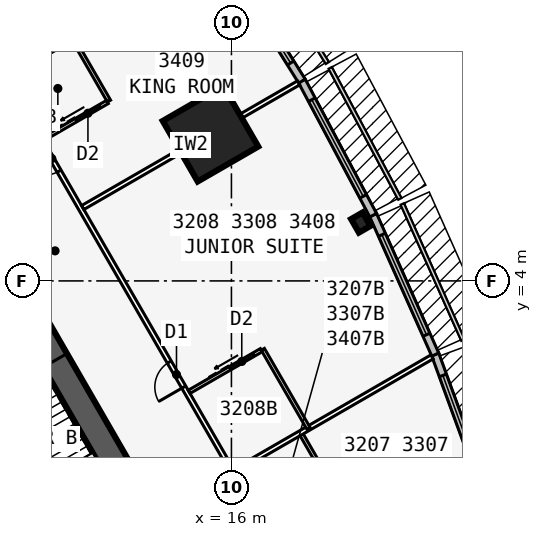
"""IFC4 building model, lengths in metres.
Left out: names, types, materials, properties, quantities, classifications, styles, units other than length and angle.
Written with IfcOpenShell. Run it as: python <this file> out.ifc"""

import sys

from ifc_helpers import new_model, si_unit, direction, frame, frame_2d, origin, origin_2d, place, context, subcontext, project, spatial, rectangle, i_section, extrude, element, fill, save


model = new_model("IFC4")
c1 = context("Model", 3, precision=1e-05, world=origin(), true_north=direction((0.0, 1.0)))
c2 = subcontext(c1, "Body", "Model", "MODEL_VIEW")
j1 = project(units=[si_unit("LENGTHUNIT", "METRE"), si_unit("PLANEANGLEUNIT", "RADIAN")], contexts=[c1])
p1 = place(None, origin())
s1 = spatial("IfcSite", under=j1, at=p1, CompositionType="ELEMENT")
p2 = place(p1, origin())
s2 = spatial("IfcBuilding", under=s1, at=p2, CompositionType="ELEMENT")
p3 = place(p2, frame((0.0, 0.0, 124.9)))
s3 = spatial("IfcBuildingStorey", under=s2, at=p3, CompositionType="ELEMENT", Elevation=124.9)
p4 = place(p3, frame((16.5, -9.526, 0.0), z_axis=(0.0, 0.0, 1.0), x_axis=(-0.499999749417, 0.866025548458, 0.0)))
e1 = element("IfcWall", 1, at=p4, inside=s3, PredefinedType="SHEAR", context=c2, shape_type="SweptSolid", body=[
    extrude(rectangle(XDim=33.0, YDim=0.9, at=frame_2d((16.5, 0.0))), origin(), (0.0, 0.0, 1.0), 3.4),
])
p5 = place(p4, frame((14.15, 0.0, 0.0)))
e2 = element("IfcOpeningElement", 2, at=p5, cuts=e1, PredefinedType="OPENING", context=c2, shape_type="SweptSolid", body=[
    extrude(rectangle(XDim=1.8, YDim=2.13, at=frame_2d((0.9, 1.065))), frame((0.0, 0.46, 0.0), z_axis=(0.0, -1.0, 0.0), x_axis=(1.0, 0.0, 0.0)), (0.0, 0.0, 1.0), 0.92),
])
p6 = place(p4, frame((12.6, 0.0, 0.0)))
e3 = element("IfcOpeningElement", 3, at=p6, cuts=e1, PredefinedType="OPENING", context=c2, shape_type="SweptSolid", body=[
    extrude(rectangle(XDim=1.0, YDim=2.13, at=frame_2d((0.5, 1.065))), frame((0.0, 0.46, 0.0), z_axis=(0.0, -1.0, 0.0), x_axis=(1.0, 0.0, 0.0)), (0.0, 0.0, 1.0), 0.92),
])
p7 = place(p3, frame((10.245, -5.843, 0.0), z_axis=(0.0, 0.0, 1.0), x_axis=(-0.499993009313, 0.866029439822, 0.0)))
e4 = element("IfcWall", 4, at=p7, inside=s3, PredefinedType="SOLIDWALL", context=c2, shape_type="SweptSolid", body=[
    extrude(rectangle(XDim=7.733, YDim=0.25, at=frame_2d((3.866, 0.0))), origin(), (0.0, 0.0, 1.0), 3.235),
])
p8 = place(p3, frame((20.254, 5.92, 0.0), z_axis=(0.0, 0.0, 1.0), x_axis=(0.866025403784, 0.5, 0.0)))
e5 = element("IfcColumn", 5, at=p8, inside=s3, PredefinedType="COLUMN", context=c2, shape_type="SweptSolid", body=[
    extrude(i_section(OverallWidth=0.437, OverallDepth=0.513, WebThickness=0.061, FlangeThickness=0.097, at=origin_2d()), origin(), (0.0, 0.0, 1.0), 3.4),
])
p9 = place(p3, frame((15.312, 8.84, 0.0), z_axis=(0.0, 0.0, 1.0), x_axis=(0.866025403784, 0.5, 0.0)))
e6 = element("IfcColumn", 6, at=p9, inside=s3, PredefinedType="COLUMN", context=c2, shape_type="SweptSolid", body=[
    extrude(rectangle(XDim=2.3, YDim=2.3, at=origin_2d()), origin(), (0.0, 0.0, 1.0), 3.4),
])
p10 = place(p3, frame((24.444, -3.183, 0.0), z_axis=(0.0, 0.0, 1.0), x_axis=(-0.343225593282, 0.939252996863, 0.0)))
e7 = element("IfcWall", 7, at=p10, inside=s3, PredefinedType="STANDARD", context=c2, shape_type="SweptSolid", body=[
    extrude(rectangle(XDim=5.076, YDim=0.25, at=frame_2d((2.538, 0.0))), origin(), (0.0, 0.0, 1.0), 3.235),
])
p11 = place(p10, frame((0.738, 0.0, 0.45)))
e8 = element("IfcOpeningElement", 8, at=p11, cuts=e7, PredefinedType="OPENING", context=c2, shape_type="SweptSolid", body=[
    extrude(rectangle(XDim=3.6, YDim=2.4, at=frame_2d((1.8, 1.2))), frame((0.0, 0.135, 0.0), z_axis=(0.0, -1.0, 0.0), x_axis=(1.0, 0.0, 0.0)), (0.0, 0.0, 1.0), 0.27),
])
p12 = place(p3, frame((22.705, 1.576, 0.0), z_axis=(0.0, 0.0, 1.0), x_axis=(-0.406832200364, 0.913502906808, 0.0)))
e9 = element("IfcWall", 9, at=p12, inside=s3, PredefinedType="STANDARD", context=c2, shape_type="SweptSolid", body=[
    extrude(rectangle(XDim=5.028, YDim=0.25, at=frame_2d((2.514, 0.0))), origin(), (0.0, 0.0, 1.0), 3.235),
])
p13 = place(p12, frame((0.714, 0.0, 0.45)))
e10 = element("IfcOpeningElement", 10, at=p13, cuts=e9, PredefinedType="OPENING", context=c2, shape_type="SweptSolid", body=[
    extrude(rectangle(XDim=3.6, YDim=2.4, at=frame_2d((1.8, 1.2))), frame((0.0, 0.135, 0.0), z_axis=(0.0, -1.0, 0.0), x_axis=(1.0, 0.0, 0.0)), (0.0, 0.0, 1.0), 0.27),
])
p14 = place(p3, frame((20.663, 6.161, 0.0), z_axis=(0.0, 0.0, 1.0), x_axis=(-0.469404966864, 0.882982999317, 0.0)))
e11 = element("IfcWall", 11, at=p14, inside=s3, PredefinedType="STANDARD", context=c2, shape_type="SweptSolid", body=[
    extrude(rectangle(XDim=5.003, YDim=0.25, at=frame_2d((2.501, 0.0))), origin(), (0.0, 0.0, 1.0), 3.235),
])
p15 = place(p14, frame((0.701, 0.0, 0.45)))
e12 = element("IfcOpeningElement", 12, at=p15, cuts=e11, PredefinedType="OPENING", context=c2, shape_type="SweptSolid", body=[
    extrude(rectangle(XDim=3.6, YDim=2.4, at=frame_2d((1.8, 1.2))), frame((0.0, 0.135, 0.0), z_axis=(0.0, -1.0, 0.0), x_axis=(1.0, 0.0, 0.0)), (0.0, 0.0, 1.0), 0.27),
])
p16 = place(p3, frame((18.319, 10.571, 0.0), z_axis=(0.0, 0.0, 1.0), x_axis=(-0.529990167382, 0.84800378683, 0.0)))
e13 = element("IfcWall", 13, at=p16, inside=s3, PredefinedType="STANDARD", context=c2, shape_type="SweptSolid", body=[
    extrude(rectangle(XDim=5.003, YDim=0.25, at=frame_2d((2.501, 0.0))), origin(), (0.0, 0.0, 1.0), 3.235),
])
p17 = place(p16, frame((0.701, 0.0, 0.45)))
e14 = element("IfcOpeningElement", 14, at=p17, cuts=e13, PredefinedType="OPENING", context=c2, shape_type="SweptSolid", body=[
    extrude(rectangle(XDim=3.6, YDim=2.4, at=frame_2d((1.8, 1.2))), frame((0.0, 0.135, 0.0), z_axis=(0.0, -1.0, 0.0), x_axis=(1.0, 0.0, 0.0)), (0.0, 0.0, 1.0), 0.27),
])
p18 = place(p3, frame((21.586, -11.885, 0.0), z_axis=(0.0, 0.0, 1.0), x_axis=(-0.500001915564, 0.86602429783, 0.0)))
e15 = element("IfcWall", 15, at=p18, inside=s3, PredefinedType="PARTITIONING", context=c2, shape_type="SweptSolid", body=[
    extrude(rectangle(XDim=42.172, YDim=0.15, at=frame_2d((21.086, 0.0))), origin(), (0.0, 0.0, 1.0), 3.235),
])
p19 = place(p18, frame((1.911, 0.0, 0.0)))
e16 = element("IfcOpeningElement", 16, at=p19, cuts=e15, PredefinedType="OPENING", context=c2, shape_type="SweptSolid", body=[
    extrude(rectangle(XDim=0.95, YDim=2.13, at=frame_2d((0.475, 1.065))), frame((0.0, 0.085, 0.0), z_axis=(0.0, -1.0, 0.0), x_axis=(1.0, 0.0, 0.0)), (0.0, 0.0, 1.0), 0.17),
])
p20 = place(p18, frame((7.511, 0.0, 0.0)))
e17 = element("IfcOpeningElement", 17, at=p20, cuts=e15, PredefinedType="OPENING", context=c2, shape_type="SweptSolid", body=[
    extrude(rectangle(XDim=0.95, YDim=2.13, at=frame_2d((0.475, 1.065))), frame((0.0, 0.085, 0.0), z_axis=(0.0, -1.0, 0.0), x_axis=(1.0, 0.0, 0.0)), (0.0, 0.0, 1.0), 0.17),
])
p21 = place(p18, frame((14.311, 0.0, 0.0)))
e18 = element("IfcOpeningElement", 18, at=p21, cuts=e15, PredefinedType="OPENING", context=c2, shape_type="SweptSolid", body=[
    extrude(rectangle(XDim=0.95, YDim=2.13, at=frame_2d((0.475, 1.065))), frame((0.0, 0.085, 0.0), z_axis=(0.0, -1.0, 0.0), x_axis=(1.0, 0.0, 0.0)), (0.0, 0.0, 1.0), 0.17),
])
p22 = place(p18, frame((22.511, 0.0, 0.0)))
e19 = element("IfcOpeningElement", 19, at=p22, cuts=e15, PredefinedType="OPENING", context=c2, shape_type="SweptSolid", body=[
    extrude(rectangle(XDim=0.95, YDim=2.13, at=frame_2d((0.475, 1.065))), frame((0.0, 0.085, 0.0), z_axis=(0.0, -1.0, 0.0), x_axis=(1.0, 0.0, 0.0)), (0.0, 0.0, 1.0), 0.17),
])
p23 = place(p18, frame((29.311, 0.0, 0.0)))
e20 = element("IfcOpeningElement", 20, at=p23, cuts=e15, PredefinedType="OPENING", context=c2, shape_type="SweptSolid", body=[
    extrude(rectangle(XDim=0.95, YDim=2.13, at=frame_2d((0.475, 1.065))), frame((0.0, 0.085, 0.0), z_axis=(0.0, -1.0, 0.0), x_axis=(1.0, 0.0, 0.0)), (0.0, 0.0, 1.0), 0.17),
])
p24 = place(p18, frame((39.311, 0.0, 0.0)))
e21 = element("IfcOpeningElement", 21, at=p24, cuts=e15, PredefinedType="OPENING", context=c2, shape_type="SweptSolid", body=[
    extrude(rectangle(XDim=0.95, YDim=2.13, at=frame_2d((0.475, 1.065))), frame((0.0, 0.085, 0.0), z_axis=(0.0, -1.0, 0.0), x_axis=(1.0, 0.0, 0.0)), (0.0, 0.0, 1.0), 0.17),
])
p25 = place(p3, frame((16.108, -2.247, 0.0), z_axis=(0.0, 0.0, 1.0), x_axis=(0.866025567496, 0.499999716443, 0.0)))
e22 = element("IfcWall", 22, at=p25, inside=s3, PredefinedType="PARTITIONING", context=c2, shape_type="SweptSolid", body=[
    extrude(rectangle(XDim=7.495, YDim=0.15, at=frame_2d((3.748, 0.0))), origin(), (0.0, 0.0, 1.0), 2.389),
])
p26 = place(p3, frame((11.108, 6.413, 0.0), z_axis=(0.0, 0.0, 1.0), x_axis=(0.866026407964, 0.499998260706, 0.0)))
e23 = element("IfcWall", 23, at=p26, inside=s3, PredefinedType="PARTITIONING", context=c2, shape_type="SweptSolid", body=[
    extrude(rectangle(XDim=8.199, YDim=0.15, at=frame_2d((4.099, 0.0))), origin(), (0.0, 0.0, 1.0), 2.389),
])
p27 = place(p3, frame((8.608, 10.743, 0.0), z_axis=(0.0, 0.0, 1.0), x_axis=(0.866041663918, 0.499971835565, 0.0)))
e24 = element("IfcWall", 24, at=p27, inside=s3, PredefinedType="PARTITIONING", context=c2, shape_type="SweptSolid", body=[
    extrude(rectangle(XDim=8.022, YDim=0.15, at=frame_2d((4.011, 0.0))), origin(), (0.0, 0.0, 1.0), 2.389),
])
p28 = place(p3, frame((19.473, -3.076, 0.0), z_axis=(0.0, 0.0, 1.0), x_axis=(-0.499957262057, 0.866050077142, 0.0)))
e25 = element("IfcWall", 25, at=p28, inside=s3, PredefinedType="PLUMBINGWALL", context=c2, shape_type="SweptSolid", body=[
    extrude(rectangle(XDim=2.4, YDim=0.12, at=frame_2d((1.2, 0.0))), origin(), (0.0, 0.0, 1.0), 3.235),
])
p29 = place(p3, frame((18.533, -0.847, 0.0), z_axis=(0.0, 0.0, 1.0), x_axis=(-0.499990139034, 0.866031096941, 0.0)))
e26 = element("IfcWall", 26, at=p29, inside=s3, PredefinedType="PLUMBINGWALL", context=c2, shape_type="SweptSolid", body=[
    extrude(rectangle(XDim=3.0, YDim=0.12, at=frame_2d((1.5, 0.0))), origin(), (0.0, 0.0, 1.0), 3.235),
])
p30 = place(p3, frame((14.608, 0.351, 0.0), z_axis=(0.0, 0.0, 1.0), x_axis=(0.866035715982, 0.499982138324, 0.0)))
e27 = element("IfcWall", 27, at=p30, inside=s3, PredefinedType="PLUMBINGWALL", context=c2, shape_type="SweptSolid", body=[
    extrude(rectangle(XDim=2.74, YDim=0.12, at=frame_2d((1.37, 0.0))), origin(), (0.0, 0.0, 1.0), 3.235),
])
p31 = place(p30, frame((1.55, 0.0, 0.0)))
e28 = element("IfcOpeningElement", 28, at=p31, cuts=e27, PredefinedType="OPENING", context=c2, shape_type="SweptSolid", body=[
    extrude(rectangle(XDim=0.9, YDim=2.13, at=frame_2d((0.45, 1.065))), frame((0.0, 0.07, 0.0), z_axis=(0.0, -1.0, 0.0), x_axis=(1.0, 0.0, 0.0)), (0.0, 0.0, 1.0), 0.14),
])
p32 = place(p3, frame((11.973, 9.915, 0.0), z_axis=(0.0, 0.0, 1.0), x_axis=(-0.499957262057, 0.866050077142, 0.0)))
e29 = element("IfcWall", 29, at=p32, inside=s3, PredefinedType="PLUMBINGWALL", context=c2, shape_type="SweptSolid", body=[
    extrude(rectangle(XDim=2.4, YDim=0.12, at=frame_2d((1.2, 0.0))), origin(), (0.0, 0.0, 1.0), 3.235),
])
p33 = place(p3, frame((9.808, 8.665, 0.0), z_axis=(0.0, 0.0, 1.0), x_axis=(0.866023955769, 0.500002508028, 0.0)))
e30 = element("IfcWall", 30, at=p33, inside=s3, PredefinedType="PLUMBINGWALL", context=c2, shape_type="SweptSolid", body=[
    extrude(rectangle(XDim=2.44, YDim=0.12, at=frame_2d((1.22, 0.0))), origin(), (0.0, 0.0, 1.0), 3.235),
])
p34 = place(p33, frame((1.25, 0.0, 0.0)))
e31 = element("IfcOpeningElement", 31, at=p34, cuts=e30, PredefinedType="OPENING", context=c2, shape_type="SweptSolid", body=[
    extrude(rectangle(XDim=0.9, YDim=2.13, at=frame_2d((0.45, 1.065))), frame((0.0, 0.07, 0.0), z_axis=(0.0, -1.0, 0.0), x_axis=(1.0, 0.0, 0.0)), (0.0, 0.0, 1.0), 0.14),
])
p35 = place(p3, frame((10.135, -2.401, 0.0), z_axis=(0.0, 0.0, 1.0), x_axis=(-0.499992232847, 0.866029888106, 0.0)))
e32 = element("IfcWall", 32, at=p35, inside=s3, PredefinedType="SOLIDWALL", context=c2, shape_type="SweptSolid", body=[
    extrude(rectangle(XDim=2.794, YDim=0.1, at=frame_2d((1.397, 0.0))), origin(), (0.0, 0.0, 1.0), 3.4),
])
p36 = place(p11, origin())
e33 = element("IfcWindow", 33, at=p36, inside=s3, PartitioningType="SINGLE_PANEL", PredefinedType="WINDOW", context=c2, shape_type="SweptSolid", body=[
    extrude(rectangle(XDim=3.6, YDim=2.4, at=frame_2d((1.8, 1.2))), frame((0.0, 0.03, 0.0), z_axis=(0.0, -1.0, 0.0), x_axis=(1.0, 0.0, 0.0)), (0.0, 0.0, 1.0), 0.06),
])
fill(e8, e33)
p37 = place(p13, origin())
e34 = element("IfcWindow", 34, at=p37, inside=s3, PartitioningType="SINGLE_PANEL", PredefinedType="WINDOW", context=c2, shape_type="SweptSolid", body=[
    extrude(rectangle(XDim=3.6, YDim=2.4, at=frame_2d((1.8, 1.2))), frame((0.0, 0.03, 0.0), z_axis=(0.0, -1.0, 0.0), x_axis=(1.0, 0.0, 0.0)), (0.0, 0.0, 1.0), 0.06),
])
fill(e10, e34)
p38 = place(p15, origin())
e35 = element("IfcWindow", 35, at=p38, inside=s3, PartitioningType="SINGLE_PANEL", PredefinedType="WINDOW", context=c2, shape_type="SweptSolid", body=[
    extrude(rectangle(XDim=3.6, YDim=2.4, at=frame_2d((1.8, 1.2))), frame((0.0, 0.03, 0.0), z_axis=(0.0, -1.0, 0.0), x_axis=(1.0, 0.0, 0.0)), (0.0, 0.0, 1.0), 0.06),
])
fill(e12, e35)
p39 = place(p17, origin())
e36 = element("IfcWindow", 36, at=p39, inside=s3, PartitioningType="SINGLE_PANEL", PredefinedType="WINDOW", context=c2, shape_type="SweptSolid", body=[
    extrude(rectangle(XDim=3.6, YDim=2.4, at=frame_2d((1.8, 1.2))), frame((0.0, 0.03, 0.0), z_axis=(0.0, -1.0, 0.0), x_axis=(1.0, 0.0, 0.0)), (0.0, 0.0, 1.0), 0.06),
])
fill(e14, e36)
p40 = place(p31, origin())
e37 = element("IfcDoor", 37, at=p40, inside=s3, OperationType="SLIDING_TO_LEFT", PredefinedType="DOOR", context=c2, shape_type="SweptSolid", body=[
    extrude(rectangle(XDim=0.9, YDim=2.13, at=frame_2d((0.45, 1.065))), frame((0.0, 0.025, 0.0), z_axis=(0.0, -1.0, 0.0), x_axis=(1.0, 0.0, 0.0)), (0.0, 0.0, 1.0), 0.05),
])
fill(e28, e37)
p41 = place(p21, origin())
e38 = element("IfcDoor", 38, at=p41, inside=s3, OperationType="SINGLE_SWING_LEFT", PredefinedType="DOOR", context=c2, shape_type="SweptSolid", body=[
    extrude(rectangle(XDim=0.95, YDim=2.13, at=frame_2d((0.475, 1.065))), frame((0.0, 0.025, 0.0), z_axis=(0.0, -1.0, 0.0), x_axis=(1.0, 0.0, 0.0)), (0.0, 0.0, 1.0), 0.05),
])
fill(e18, e38)
p42 = place(p34, origin())
e39 = element("IfcDoor", 39, at=p42, inside=s3, OperationType="SLIDING_TO_LEFT", PredefinedType="DOOR", context=c2, shape_type="SweptSolid", body=[
    extrude(rectangle(XDim=0.9, YDim=2.13, at=frame_2d((0.45, 1.065))), frame((0.0, 0.025, 0.0), z_axis=(0.0, -1.0, 0.0), x_axis=(1.0, 0.0, 0.0)), (0.0, 0.0, 1.0), 0.05),
])
fill(e31, e39)
p43 = place(p22, origin())
e40 = element("IfcDoor", 40, at=p43, inside=s3, OperationType="SINGLE_SWING_RIGHT", PredefinedType="DOOR", context=c2, shape_type="SweptSolid", body=[
    extrude(rectangle(XDim=0.95, YDim=2.13, at=frame_2d((0.475, 1.065))), frame((0.0, 0.025, 0.0), z_axis=(0.0, -1.0, 0.0), x_axis=(1.0, 0.0, 0.0)), (0.0, 0.0, 1.0), 0.05),
])
fill(e19, e40)
p44 = place(p6, origin())
e41 = element("IfcDoor", 41, at=p44, inside=s3, OperationType="SINGLE_SWING_RIGHT", PredefinedType="DOOR", context=c2, shape_type="SweptSolid", body=[
    extrude(rectangle(XDim=1.0, YDim=2.13, at=frame_2d((0.5, 1.065))), frame((0.0, 0.025, 0.0), z_axis=(0.0, -1.0, 0.0), x_axis=(1.0, 0.0, 0.0)), (0.0, 0.0, 1.0), 0.05),
])
fill(e3, e41)
save(model, sys.argv[1])
